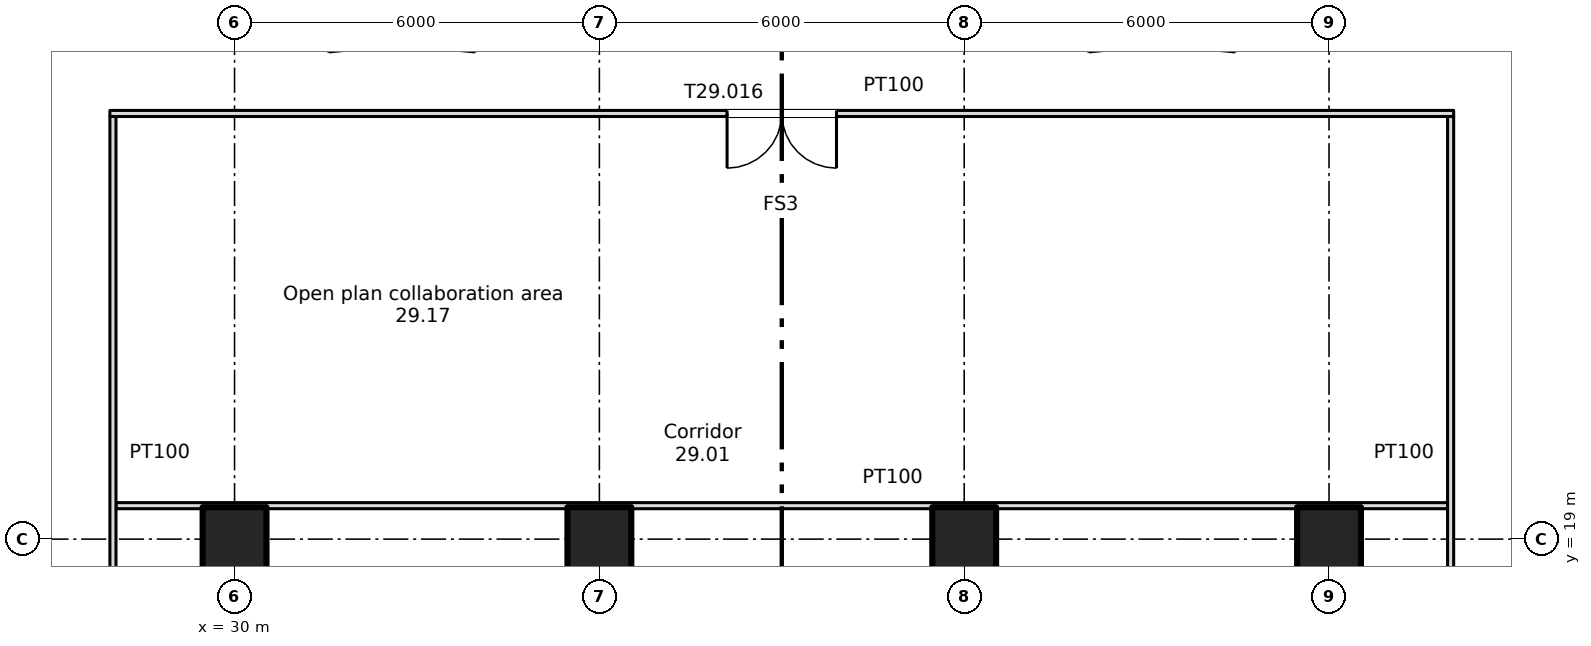
"""IFC4 building model, lengths in metres.
Left out: names, types, materials, properties, quantities, classifications, styles, units other than length and angle.
Written with IfcOpenShell. Run it as: python <this file> out.ifc"""

import sys

from ifc_helpers import new_model, si_unit, direction, frame, frame_2d, origin, origin_2d, place, context, subcontext, project, spatial, rectangle, extrude, element, fill, save


model = new_model("IFC4")
c1 = context("Model", 3, precision=1e-05, world=origin(), true_north=direction((0.0, 1.0)))
c2 = subcontext(c1, "Body", "Model", "MODEL_VIEW")
j1 = project(units=[si_unit("LENGTHUNIT", "METRE"), si_unit("PLANEANGLEUNIT", "RADIAN")], contexts=[c1])
p1 = place(None, origin())
s1 = spatial("IfcSite", under=j1, at=p1, CompositionType="ELEMENT")
p2 = place(p1, origin())
s2 = spatial("IfcBuilding", under=s1, at=p2, CompositionType="ELEMENT")
p3 = place(p2, frame((0.0, 0.0, 200.5)))
s3 = spatial("IfcBuildingStorey", under=s2, at=p3, CompositionType="ELEMENT", Elevation=200.5)
for number, where, z_axis, x_axis in (
    (1, (30.0, 19.0, 0.0), (0.0, 0.0, 1.0), (1.0, 0.0, 0.0)),
    (2, (36.0, 19.0, 0.0), (0.0, 0.0, 1.0), (1.0, 0.0, 0.0)),
    (3, (42.0, 19.0, 0.0), (0.0, 0.0, 1.0), (1.0, 0.0, 0.0)),
    (4, (48.0, 19.0, 0.0), (0.0, 0.0, 1.0), (1.0, 0.0, 0.0)),
):
    element("IfcColumn", number, at=place(p3, frame(where, z_axis=z_axis, x_axis=x_axis)), inside=s3, PredefinedType="COLUMN", context=c2, shape_type="SweptSolid", body=[
        extrude(rectangle(XDim=1.05, YDim=1.05, at=origin_2d()), origin(), (0.0, 0.0, 1.0), 3.35),
    ])
p4 = place(p3, frame((28.05, 19.55, 0.0), z_axis=(0.0, 0.0, 1.0), x_axis=(1.0, 0.0, 0.0)))
e5 = element("IfcWall", 5, at=p4, inside=s3, PredefinedType="PARTITIONING", context=c2, shape_type="SweptSolid", body=[
    extrude(rectangle(XDim=21.9, YDim=0.1, at=frame_2d((10.95, 0.0))), origin(), (0.0, 0.0, 1.0), 3.35),
])
p5 = place(p3, frame((27.95, 26.0, 0.0), z_axis=(0.0, 0.0, 1.0), x_axis=(1.0, 0.0, 0.0)))
e6 = element("IfcWall", 6, at=p5, inside=s3, PredefinedType="PARTITIONING", context=c2, shape_type="SweptSolid", body=[
    extrude(rectangle(XDim=22.1, YDim=0.1, at=frame_2d((11.05, 0.0))), origin(), (0.0, 0.0, 1.0), 3.35),
])
p6 = place(p5, frame((10.15, 0.0, 0.0)))
e7 = element("IfcOpeningElement", 7, at=p6, cuts=e6, PredefinedType="OPENING", context=c2, shape_type="SweptSolid", body=[
    extrude(rectangle(XDim=1.8, YDim=2.1, at=frame_2d((0.9, 1.05))), frame((0.0, 0.06, 0.0), z_axis=(0.0, -1.0, 0.0), x_axis=(1.0, 0.0, 0.0)), (0.0, 0.0, 1.0), 0.12),
])
for number, where, z_axis, x_axis in (
    (8, (28.0, 12.65, 0.0), (0.0, 0.0, 1.0), (0.0, 1.0, 0.0)),
    (9, (50.0, 12.65, 0.0), (0.0, 0.0, 1.0), (0.0, 1.0, 0.0)),
):
    element("IfcWall", number, at=place(p3, frame(where, z_axis=z_axis, x_axis=x_axis)), inside=s3, PredefinedType="PARTITIONING", context=c2, shape_type="SweptSolid", body=[
        extrude(rectangle(XDim=13.3, YDim=0.1, at=frame_2d((6.65, 0.0))), origin(), (0.0, 0.0, 1.0), 3.35),
    ])
p7 = place(p6, origin())
e10 = element("IfcDoor", 10, at=p7, inside=s3, OperationType="DOUBLE_DOOR_SINGLE_SWING", PredefinedType="DOOR", context=c2, shape_type="SweptSolid", body=[
    extrude(rectangle(XDim=1.8, YDim=2.1, at=frame_2d((0.9, 1.05))), frame((0.0, 0.025, 0.0), z_axis=(0.0, -1.0, 0.0), x_axis=(1.0, 0.0, 0.0)), (0.0, 0.0, 1.0), 0.05),
])
fill(e7, e10)
save(model, sys.argv[1])
